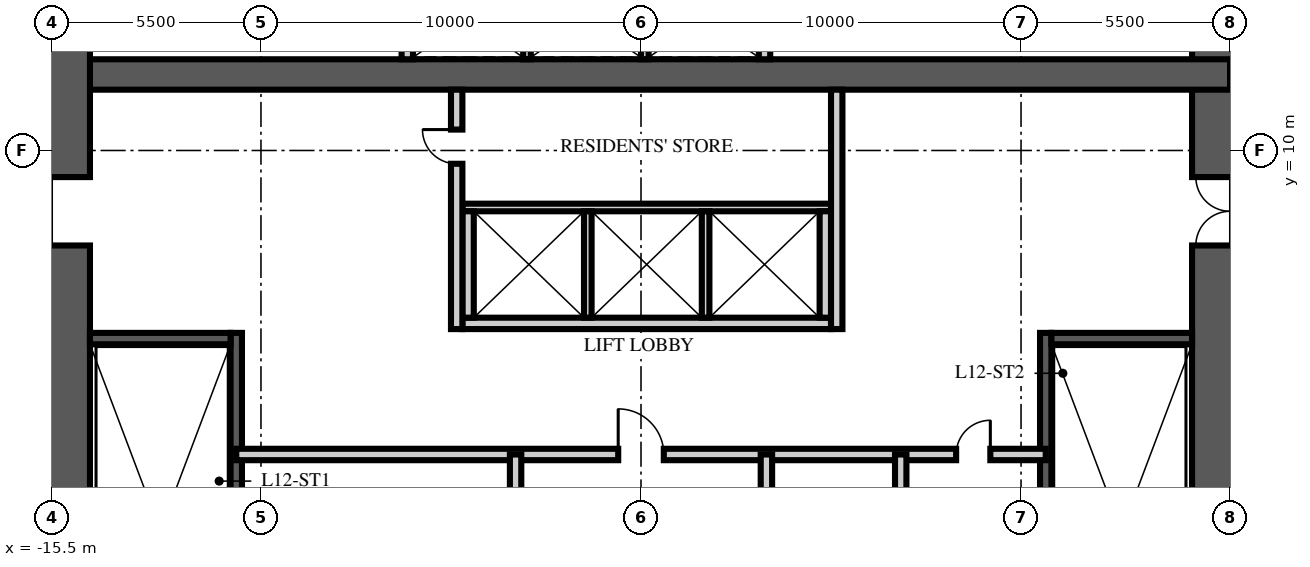
"""IFC4 building model, lengths in metres.
Left out: names, types, materials, properties, quantities, classifications, styles, units other than length and angle.
Written with IfcOpenShell. Run it as: python <this file> out.ifc"""

import sys

from ifc_helpers import new_model, si_unit, direction, frame, frame_2d, origin, place, context, subcontext, project, spatial, rectangle, extrude, element, fill, save


model = new_model("IFC4")
c1 = context("Model", 3, precision=1e-05, world=origin(), true_north=direction((0.0, 1.0)))
c2 = subcontext(c1, "Body", "Model", "MODEL_VIEW")
j1 = project(units=[si_unit("LENGTHUNIT", "METRE"), si_unit("PLANEANGLEUNIT", "RADIAN")], contexts=[c1])
p1 = place(None, origin())
s1 = spatial("IfcSite", under=j1, at=p1, CompositionType="ELEMENT")
p2 = place(p1, origin())
s2 = spatial("IfcBuilding", under=s1, at=p2, CompositionType="ELEMENT")
p3 = place(p2, frame((0.0, 0.0, 51.0)))
s3 = spatial("IfcBuildingStorey", under=s2, at=p3, CompositionType="ELEMENT", Elevation=51.0)
p4 = place(p3, frame((15.5, -15.5, -0.25), z_axis=(0.0, 0.0, 1.0), x_axis=(0.0, 1.0, 0.0)))
e1 = element("IfcWall", 1, at=p4, inside=s3, PredefinedType="SHEAR", context=c2, shape_type="SweptSolid", body=[
    extrude(rectangle(XDim=31.0, YDim=2.0, at=frame_2d((15.5, 0.0))), origin(), (0.0, 0.0, 1.0), 3.75),
])
p5 = place(p4, frame((6.5, 0.0, 0.25)))
e2 = element("IfcOpeningElement", 2, at=p5, cuts=e1, PredefinedType="OPENING", context=c2, shape_type="SweptSolid", body=[
    extrude(rectangle(XDim=1.2, YDim=2.1, at=frame_2d((0.6, 1.05))), frame((0.0, 1.01, 0.0), z_axis=(0.0, -1.0, 0.0), x_axis=(1.0, 0.0, 0.0)), (0.0, 0.0, 1.0), 2.02),
])
p6 = place(p4, frame((23.0, 0.0, 0.25)))
e3 = element("IfcOpeningElement", 3, at=p6, cuts=e1, PredefinedType="OPENING", context=c2, shape_type="SweptSolid", body=[
    extrude(rectangle(XDim=1.8, YDim=2.1, at=frame_2d((0.9, 1.05))), frame((0.0, 1.01, 0.0), z_axis=(0.0, -1.0, 0.0), x_axis=(1.0, 0.0, 0.0)), (0.0, 0.0, 1.0), 2.02),
])
p7 = place(p3, frame((-15.5, 12.0, -0.25), z_axis=(0.0, 0.0, 1.0), x_axis=(1.0, 0.0, 0.0)))
e4 = element("IfcWall", 4, at=p7, inside=s3, PredefinedType="SHEAR", context=c2, shape_type="SweptSolid", body=[
    extrude(rectangle(XDim=31.0, YDim=0.8, at=frame_2d((15.5, 0.0))), origin(), (0.0, 0.0, 1.0), 3.75),
])
p8 = place(p3, frame((-15.5, -15.5, -0.25), z_axis=(0.0, 0.0, 1.0), x_axis=(0.0, 1.0, 0.0)))
e5 = element("IfcWall", 5, at=p8, inside=s3, PredefinedType="SHEAR", context=c2, shape_type="SweptSolid", body=[
    extrude(rectangle(XDim=31.0, YDim=2.0, at=frame_2d((15.5, 0.0))), origin(), (0.0, 0.0, 1.0), 3.75),
])
p9 = place(p8, frame((6.5, 0.0, 0.25)))
e6 = element("IfcOpeningElement", 6, at=p9, cuts=e5, PredefinedType="OPENING", context=c2, shape_type="SweptSolid", body=[
    extrude(rectangle(XDim=1.2, YDim=2.1, at=frame_2d((0.6, 1.05))), frame((0.0, 1.01, 0.0), z_axis=(0.0, -1.0, 0.0), x_axis=(1.0, 0.0, 0.0)), (0.0, 0.0, 1.0), 2.02),
])
p10 = place(p8, frame((23.0, 0.0, 0.25)))
e7 = element("IfcOpeningElement", 7, at=p10, cuts=e5, PredefinedType="OPENING", context=c2, shape_type="SweptSolid", body=[
    extrude(rectangle(XDim=1.8, YDim=2.1, at=frame_2d((0.9, 1.05))), frame((0.0, 1.01, 0.0), z_axis=(0.0, -1.0, 0.0), x_axis=(1.0, 0.0, 0.0)), (0.0, 0.0, 1.0), 2.02),
])
p11 = place(p3, frame((-10.65, -4.9, 0.0), z_axis=(0.0, 0.0, 1.0), x_axis=(0.0, 1.0, 0.0)))
e8 = element("IfcWall", 8, at=p11, inside=s3, PredefinedType="SOLIDWALL", context=c2, shape_type="SweptSolid", body=[
    extrude(rectangle(XDim=10.1, YDim=0.3, at=frame_2d((5.05, 0.0))), origin(), (0.0, 0.0, 1.0), 3.5),
])
p12 = place(p3, frame((-14.5, 5.05, 0.0), z_axis=(0.0, 0.0, 1.0), x_axis=(1.0, 0.0, 0.0)))
e9 = element("IfcWall", 9, at=p12, inside=s3, PredefinedType="SOLIDWALL", context=c2, shape_type="SweptSolid", body=[
    extrude(rectangle(XDim=3.7, YDim=0.3, at=frame_2d((1.85, 0.0))), origin(), (0.0, 0.0, 1.0), 3.5),
])
p13 = place(p3, frame((10.65, -4.9, 0.0), z_axis=(0.0, 0.0, 1.0), x_axis=(0.0, 1.0, 0.0)))
e10 = element("IfcWall", 10, at=p13, inside=s3, PredefinedType="SOLIDWALL", context=c2, shape_type="SweptSolid", body=[
    extrude(rectangle(XDim=10.1, YDim=0.3, at=frame_2d((5.05, 0.0))), origin(), (0.0, 0.0, 1.0), 3.5),
])
p14 = place(p3, frame((14.5, 5.05, 0.0), z_axis=(0.0, 0.0, 1.0), x_axis=(-1.0, 0.0, 0.0)))
e11 = element("IfcWall", 11, at=p14, inside=s3, PredefinedType="SOLIDWALL", context=c2, shape_type="SweptSolid", body=[
    extrude(rectangle(XDim=3.7, YDim=0.3, at=frame_2d((1.85, 0.0))), origin(), (0.0, 0.0, 1.0), 3.5),
])
p15 = place(p3, frame((-4.7, 5.45, 0.0), z_axis=(0.0, 0.0, 1.0), x_axis=(1.0, 0.0, 0.0)))
e12 = element("IfcWall", 12, at=p15, inside=s3, PredefinedType="PARTITIONING", context=c2, shape_type="SweptSolid", body=[
    extrude(rectangle(XDim=9.7, YDim=0.3, at=frame_2d((4.85, 0.0))), origin(), (0.0, 0.0, 1.0), 3.5),
])
p16 = place(p3, frame((-4.7, 8.5, 0.0), z_axis=(0.0, 0.0, 1.0), x_axis=(1.0, 0.0, 0.0)))
e13 = element("IfcWall", 13, at=p16, inside=s3, PredefinedType="PARTITIONING", context=c2, shape_type="SweptSolid", body=[
    extrude(rectangle(XDim=9.7, YDim=0.2, at=frame_2d((4.85, 0.0))), origin(), (0.0, 0.0, 1.0), 3.5),
])
for number, where, z_axis, x_axis in (
    (14, (-4.55, 5.6, 0.0), (0.0, 0.0, 1.0), (0.0, 1.0, 0.0)),
    (15, (4.85, 5.6, 0.0), (0.0, 0.0, 1.0), (0.0, 1.0, 0.0)),
):
    element("IfcWall", number, at=place(p3, frame(where, z_axis=z_axis, x_axis=x_axis)), inside=s3, PredefinedType="PARTITIONING", context=c2, shape_type="SweptSolid", body=[
        extrude(rectangle(XDim=2.8, YDim=0.3, at=frame_2d((1.4, 0.0))), origin(), (0.0, 0.0, 1.0), 3.5),
    ])
for number, where, z_axis, x_axis in (
    (16, (-1.4, 5.6, 0.0), (0.0, 0.0, 1.0), (0.0, 1.0, 0.0)),
    (17, (1.7, 5.6, 0.0), (0.0, 0.0, 1.0), (0.0, 1.0, 0.0)),
):
    element("IfcWall", number, at=place(p3, frame(where, z_axis=z_axis, x_axis=x_axis)), inside=s3, PredefinedType="PARTITIONING", context=c2, shape_type="SweptSolid", body=[
        extrude(rectangle(XDim=2.8, YDim=0.2, at=frame_2d((1.4, 0.0))), origin(), (0.0, 0.0, 1.0), 3.5),
    ])
for number, where, z_axis, x_axis in (
    (18, (-6.15, 12.4, 0.0), (0.0, 0.0, 1.0), (0.0, 1.0, 0.0)),
    (19, (3.25, 12.4, 0.0), (0.0, 0.0, 1.0), (0.0, 1.0, 0.0)),
):
    element("IfcWall", number, at=place(p3, frame(where, z_axis=z_axis, x_axis=x_axis)), inside=s3, PredefinedType="PARTITIONING", context=c2, shape_type="SweptSolid", body=[
        extrude(rectangle(XDim=2.1, YDim=0.3, at=frame_2d((1.05, 0.0))), origin(), (0.0, 0.0, 1.0), 3.5),
    ])
for number, where, z_axis, x_axis in (
    (20, (-3.0, 12.4, 0.0), (0.0, 0.0, 1.0), (0.0, 1.0, 0.0)),
    (21, (0.1, 12.4, 0.0), (0.0, 0.0, 1.0), (0.0, 1.0, 0.0)),
):
    element("IfcWall", number, at=place(p3, frame(where, z_axis=z_axis, x_axis=x_axis)), inside=s3, PredefinedType="PARTITIONING", context=c2, shape_type="SweptSolid", body=[
        extrude(rectangle(XDim=2.1, YDim=0.2, at=frame_2d((1.05, 0.0))), origin(), (0.0, 0.0, 1.0), 3.5),
    ])
p17 = place(p3, frame((-10.65, 2.0, 0.0), z_axis=(0.0, 0.0, 1.0), x_axis=(1.0, 0.0, 0.0)))
e22 = element("IfcWall", 22, at=p17, inside=s3, PredefinedType="PARTITIONING", context=c2, shape_type="SweptSolid", body=[
    extrude(rectangle(XDim=21.3, YDim=0.3, at=frame_2d((10.65, 0.0))), origin(), (0.0, 0.0, 1.0), 3.5),
])
p18 = place(p17, frame((10.05, 0.0, 0.0)))
e23 = element("IfcOpeningElement", 23, at=p18, cuts=e22, PredefinedType="OPENING", context=c2, shape_type="SweptSolid", body=[
    extrude(rectangle(XDim=1.2, YDim=2.1, at=frame_2d((0.6, 1.05))), frame((0.0, 0.16, 0.0), z_axis=(0.0, -1.0, 0.0), x_axis=(1.0, 0.0, 0.0)), (0.0, 0.0, 1.0), 0.32),
])
p19 = place(p17, frame((18.942, 0.0, 0.0)))
e24 = element("IfcOpeningElement", 24, at=p19, cuts=e22, PredefinedType="OPENING", context=c2, shape_type="SweptSolid", body=[
    extrude(rectangle(XDim=0.9, YDim=2.1, at=frame_2d((0.45, 1.05))), frame((0.0, 0.16, 0.0), z_axis=(0.0, -1.0, 0.0), x_axis=(1.0, 0.0, 0.0)), (0.0, 0.0, 1.0), 0.32),
])
p20 = place(p3, frame((-3.3, -6.65, 0.0), z_axis=(0.0, 0.0, 1.0), x_axis=(0.0, 1.0, 0.0)))
e25 = element("IfcWall", 25, at=p20, inside=s3, PredefinedType="PARTITIONING", context=c2, shape_type="SweptSolid", body=[
    extrude(rectangle(XDim=8.65, YDim=0.3, at=frame_2d((4.325, 0.0))), origin(), (0.0, 0.0, 1.0), 3.5),
])
p21 = place(p20, frame((1.75, 0.0, 0.0)))
e26 = element("IfcOpeningElement", 26, at=p21, cuts=e25, PredefinedType="OPENING", context=c2, shape_type="SweptSolid", body=[
    extrude(rectangle(XDim=0.9, YDim=2.1, at=frame_2d((0.45, 1.05))), frame((0.0, 0.16, 0.0), z_axis=(0.0, -1.0, 0.0), x_axis=(1.0, 0.0, 0.0)), (0.0, 0.0, 1.0), 0.32),
])
p22 = place(p20, frame((6.075, 0.0, 0.0)))
e27 = element("IfcOpeningElement", 27, at=p22, cuts=e25, PredefinedType="OPENING", context=c2, shape_type="SweptSolid", body=[
    extrude(rectangle(XDim=0.9, YDim=2.1, at=frame_2d((0.45, 1.05))), frame((0.0, 0.16, 0.0), z_axis=(0.0, -1.0, 0.0), x_axis=(1.0, 0.0, 0.0)), (0.0, 0.0, 1.0), 0.32),
])
p23 = place(p3, frame((3.3, -6.65, 0.0), z_axis=(0.0, 0.0, 1.0), x_axis=(0.0, 1.0, 0.0)))
e28 = element("IfcWall", 28, at=p23, inside=s3, PredefinedType="PARTITIONING", context=c2, shape_type="SweptSolid", body=[
    extrude(rectangle(XDim=8.65, YDim=0.3, at=frame_2d((4.325, 0.0))), origin(), (0.0, 0.0, 1.0), 3.5),
])
p24 = place(p23, frame((3.875, 0.0, 0.0)))
e29 = element("IfcOpeningElement", 29, at=p24, cuts=e28, PredefinedType="OPENING", context=c2, shape_type="SweptSolid", body=[
    extrude(rectangle(XDim=0.9, YDim=2.1, at=frame_2d((0.45, 1.05))), frame((0.0, 0.16, 0.0), z_axis=(0.0, -1.0, 0.0), x_axis=(1.0, 0.0, 0.0)), (0.0, 0.0, 1.0), 0.32),
])
p25 = place(p3, frame((6.834, -6.65, 0.0), z_axis=(0.0, 0.0, 1.0), x_axis=(0.0, 1.0, 0.0)))
e30 = element("IfcWall", 30, at=p25, inside=s3, PredefinedType="PARTITIONING", context=c2, shape_type="SweptSolid", body=[
    extrude(rectangle(XDim=8.65, YDim=0.3, at=frame_2d((4.325, 0.0))), origin(), (0.0, 0.0, 1.0), 3.5),
])
p26 = place(p3, frame((-4.85, 5.3, 0.0), z_axis=(0.0, 0.0, 1.0), x_axis=(0.0, 1.0, 0.0)))
e31 = element("IfcWall", 31, at=p26, inside=s3, PredefinedType="PARTITIONING", context=c2, shape_type="SweptSolid", body=[
    extrude(rectangle(XDim=6.3, YDim=0.3, at=frame_2d((3.15, 0.0))), origin(), (0.0, 0.0, 1.0), 3.5),
])
p27 = place(p26, frame((4.35, 0.0, 0.0)))
e32 = element("IfcOpeningElement", 32, at=p27, cuts=e31, PredefinedType="OPENING", context=c2, shape_type="SweptSolid", body=[
    extrude(rectangle(XDim=0.9, YDim=2.1, at=frame_2d((0.45, 1.05))), frame((0.0, 0.16, 0.0), z_axis=(0.0, -1.0, 0.0), x_axis=(1.0, 0.0, 0.0)), (0.0, 0.0, 1.0), 0.32),
])
p28 = place(p3, frame((5.15, 5.3, 0.0), z_axis=(0.0, 0.0, 1.0), x_axis=(0.0, 1.0, 0.0)))
e33 = element("IfcWall", 33, at=p28, inside=s3, PredefinedType="PARTITIONING", context=c2, shape_type="SweptSolid", body=[
    extrude(rectangle(XDim=6.3, YDim=0.3, at=frame_2d((3.15, 0.0))), origin(), (0.0, 0.0, 1.0), 3.5),
])
p29 = place(p10, origin())
e34 = element("IfcDoor", 34, at=p29, inside=s3, OperationType="DOUBLE_DOOR_SINGLE_SWING", PredefinedType="DOOR", context=c2, shape_type="SweptSolid", body=[
    extrude(rectangle(XDim=1.8, YDim=2.1, at=frame_2d((0.9, 1.05))), frame((0.0, 0.025, 0.0), z_axis=(0.0, -1.0, 0.0), x_axis=(1.0, 0.0, 0.0)), (0.0, 0.0, 1.0), 0.05),
])
fill(e7, e34)
p30 = place(p6, origin())
e35 = element("IfcDoor", 35, at=p30, inside=s3, OperationType="DOUBLE_DOOR_SINGLE_SWING", PredefinedType="DOOR", context=c2, shape_type="SweptSolid", body=[
    extrude(rectangle(XDim=1.8, YDim=2.1, at=frame_2d((0.9, 1.05))), frame((0.0, 0.025, 0.0), z_axis=(0.0, -1.0, 0.0), x_axis=(1.0, 0.0, 0.0)), (0.0, 0.0, 1.0), 0.05),
])
fill(e3, e35)
p31 = place(p18, origin())
e36 = element("IfcDoor", 36, at=p31, inside=s3, OperationType="SINGLE_SWING_LEFT", PredefinedType="DOOR", context=c2, shape_type="SweptSolid", body=[
    extrude(rectangle(XDim=1.2, YDim=2.1, at=frame_2d((0.6, 1.05))), frame((0.0, 0.025, 0.0), z_axis=(0.0, -1.0, 0.0), x_axis=(1.0, 0.0, 0.0)), (0.0, 0.0, 1.0), 0.05),
])
fill(e23, e36)
p32 = place(p19, origin())
e37 = element("IfcDoor", 37, at=p32, inside=s3, OperationType="SINGLE_SWING_RIGHT", PredefinedType="DOOR", context=c2, shape_type="SweptSolid", body=[
    extrude(rectangle(XDim=0.9, YDim=2.1, at=frame_2d((0.45, 1.05))), frame((0.0, 0.025, 0.0), z_axis=(0.0, -1.0, 0.0), x_axis=(1.0, 0.0, 0.0)), (0.0, 0.0, 1.0), 0.05),
])
fill(e24, e37)
p33 = place(p27, origin())
e38 = element("IfcDoor", 38, at=p33, inside=s3, OperationType="SINGLE_SWING_RIGHT", PredefinedType="DOOR", context=c2, shape_type="SweptSolid", body=[
    extrude(rectangle(XDim=0.9, YDim=2.1, at=frame_2d((0.45, 1.05))), frame((0.0, 0.025, 0.0), z_axis=(0.0, -1.0, 0.0), x_axis=(1.0, 0.0, 0.0)), (0.0, 0.0, 1.0), 0.05),
])
fill(e32, e38)
save(model, sys.argv[1])
